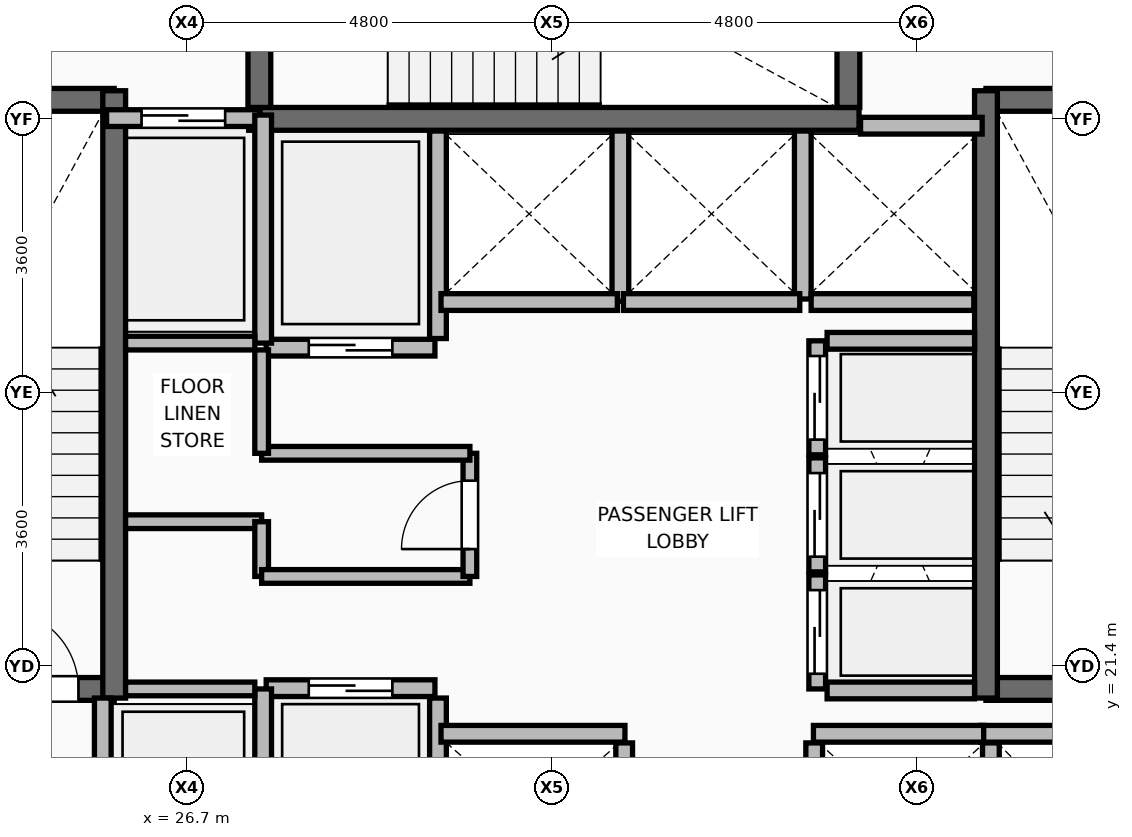
"""IFC4 building model, lengths in metres.
Left out: names, types, materials, properties, quantities, classifications, styles, units other than length and angle.
Written with IfcOpenShell. Run it as: python <this file> out.ifc"""

import sys

from ifc_helpers import new_model, si_unit, direction, frame, frame_2d, origin, place, context, subcontext, project, spatial, rectangle, extrude, element, fill, save


model = new_model("IFC4")
c1 = context("Model", 3, precision=1e-05, world=origin(), true_north=direction((0.0, 1.0)))
c2 = subcontext(c1, "Body", "Model", "MODEL_VIEW")
j1 = project(units=[si_unit("LENGTHUNIT", "METRE"), si_unit("PLANEANGLEUNIT", "RADIAN")], contexts=[c1])
p1 = place(None, origin())
s1 = spatial("IfcSite", under=j1, at=p1, CompositionType="ELEMENT")
p2 = place(p1, origin())
s2 = spatial("IfcBuilding", under=s1, at=p2, CompositionType="ELEMENT")
p3 = place(p2, frame((0.0, 0.0, 145.95)))
s3 = spatial("IfcBuildingStorey", under=s2, at=p3, CompositionType="ELEMENT", Elevation=145.95)
p4 = place(p3, frame((30.0, 18.08, 0.0), z_axis=(0.0, 0.0, 1.0), x_axis=(0.0, 1.0, 0.0)))
e1 = element("IfcWall", 1, at=p4, inside=s3, PredefinedType="PARTITIONING", context=c2, shape_type="SweptSolid", body=[
    extrude(rectangle(XDim=2.9, YDim=0.22, at=frame_2d((1.45, 0.0))), origin(), (0.0, 0.0, 1.0), 3.545),
])
for number, where, z_axis, x_axis in (
    (2, (32.45, 17.92, 0.0), (0.0, 0.0, 1.0), (0.0, 1.0, 0.0)),
    (3, (34.95, 17.92, 0.0), (0.0, 0.0, 1.0), (0.0, 1.0, 0.0)),
):
    element("IfcWall", number, at=place(p3, frame(where, z_axis=z_axis, x_axis=x_axis)), inside=s3, PredefinedType="PARTITIONING", context=c2, shape_type="SweptSolid", body=[
        extrude(rectangle(XDim=2.47, YDim=0.22, at=frame_2d((1.235, 0.0))), origin(), (0.0, 0.0, 1.0), 3.006),
    ])
p5 = place(p3, frame((37.275, 18.08, 0.0), z_axis=(0.0, 0.0, 1.0), x_axis=(0.0, 1.0, 0.0)))
e4 = element("IfcWall", 4, at=p5, inside=s3, PredefinedType="PARTITIONING", context=c2, shape_type="SweptSolid", body=[
    extrude(rectangle(XDim=2.31, YDim=0.22, at=frame_2d((1.155, 0.0))), origin(), (0.0, 0.0, 1.0), 3.545),
])
p6 = place(p3, frame((30.0, 25.71, 0.0), z_axis=(0.0, 0.0, 1.0), x_axis=(0.0, 1.0, 0.0)))
e5 = element("IfcWall", 5, at=p6, inside=s3, PredefinedType="PARTITIONING", context=c2, shape_type="SweptSolid", body=[
    extrude(rectangle(XDim=2.73, YDim=0.22, at=frame_2d((1.365, 0.0))), origin(), (0.0, 0.0, 1.0), 3.545),
])
p7 = place(p3, frame((32.4, 26.2, 0.0), z_axis=(0.0, 0.0, 1.0), x_axis=(0.0, 1.0, 0.0)))
e6 = element("IfcWall", 6, at=p7, inside=s3, PredefinedType="PARTITIONING", context=c2, shape_type="SweptSolid", body=[
    extrude(rectangle(XDim=2.24, YDim=0.22, at=frame_2d((1.12, 0.0))), origin(), (0.0, 0.0, 1.0), 3.545),
])
p8 = place(p3, frame((34.8, 26.23, 0.0), z_axis=(0.0, 0.0, 1.0), x_axis=(0.0, 1.0, 0.0)))
e7 = element("IfcWall", 7, at=p8, inside=s3, PredefinedType="PARTITIONING", context=c2, shape_type="SweptSolid", body=[
    extrude(rectangle(XDim=2.21, YDim=0.22, at=frame_2d((1.105, 0.0))), origin(), (0.0, 0.0, 1.0), 3.545),
])
p9 = place(p3, frame((34.91, 26.19, 0.0), z_axis=(0.0, 0.0, 1.0), x_axis=(1.0, 0.0, 0.0)))
e8 = element("IfcWall", 8, at=p9, inside=s3, PredefinedType="PARTITIONING", context=c2, shape_type="SweptSolid", body=[
    extrude(rectangle(XDim=2.14, YDim=0.22, at=frame_2d((1.07, 0.0))), origin(), (0.0, 0.0, 1.0), 3.545),
])
p10 = place(p3, frame((22.175, 21.1, 0.0), z_axis=(0.0, 0.0, 1.0), x_axis=(1.0, 0.0, 0.0)))
e9 = element("IfcWall", 9, at=p10, inside=s3, PredefinedType="SHEAR", context=c2, shape_type="SweptSolid", body=[
    extrude(rectangle(XDim=3.565, YDim=0.3, at=frame_2d((1.782, 0.0))), origin(), (0.0, 0.0, 1.0), 3.57),
])
p11 = place(p10, frame((2.045, 0.0, 0.0)))
e10 = element("IfcOpeningElement", 10, at=p11, cuts=e9, PredefinedType="OPENING", context=c2, shape_type="SweptSolid", body=[
    extrude(rectangle(XDim=1.05, YDim=2.1, at=frame_2d((0.525, 1.05))), frame((0.0, 0.16, 0.0), z_axis=(0.0, -1.0, 0.0), x_axis=(1.0, 0.0, 0.0)), (0.0, 0.0, 1.0), 0.32),
])
p12 = place(p3, frame((22.175, 28.85, 0.0), z_axis=(0.0, 0.0, 1.0), x_axis=(1.0, 0.0, 0.0)))
e11 = element("IfcWall", 11, at=p12, inside=s3, PredefinedType="SHEAR", context=c2, shape_type="SweptSolid", body=[
    extrude(rectangle(XDim=3.565, YDim=0.3, at=frame_2d((1.782, 0.0))), origin(), (0.0, 0.0, 1.0), 3.57),
])
p13 = place(p3, frame((25.74, 20.98, 0.0), z_axis=(0.0, 0.0, 1.0), x_axis=(0.0, 1.0, 0.0)))
e12 = element("IfcWall", 12, at=p13, inside=s3, PredefinedType="SHEAR", context=c2, shape_type="SweptSolid", body=[
    extrude(rectangle(XDim=7.99, YDim=0.3, at=frame_2d((3.995, 0.0))), origin(), (0.0, 0.0, 1.0), 3.57),
])
for number, where, z_axis, x_axis in (
    (13, (37.21, 21.1, 0.0), (0.0, 0.0, 1.0), (1.0, 0.0, 0.0)),
    (14, (37.21, 28.85, 0.0), (0.0, 0.0, 1.0), (1.0, 0.0, 0.0)),
):
    element("IfcWall", number, at=place(p3, frame(where, z_axis=z_axis, x_axis=x_axis)), inside=s3, PredefinedType="SHEAR", context=c2, shape_type="SweptSolid", body=[
        extrude(rectangle(XDim=3.615, YDim=0.3, at=frame_2d((1.808, 0.0))), origin(), (0.0, 0.0, 1.0), 3.57),
    ])
p14 = place(p3, frame((37.21, 20.98, 0.0), z_axis=(0.0, 0.0, 1.0), x_axis=(0.0, 1.0, 0.0)))
e15 = element("IfcWall", 15, at=p14, inside=s3, PredefinedType="SHEAR", context=c2, shape_type="SweptSolid", body=[
    extrude(rectangle(XDim=7.99, YDim=0.3, at=frame_2d((3.995, 0.0))), origin(), (0.0, 0.0, 1.0), 3.57),
])
p15 = place(p3, frame((27.51, 28.6, 0.0), z_axis=(0.0, 0.0, 1.0), x_axis=(1.0, 0.0, 0.0)))
e16 = element("IfcWall", 16, at=p15, inside=s3, PredefinedType="SHEAR", context=c2, shape_type="SweptSolid", body=[
    extrude(rectangle(XDim=8.03, YDim=0.3, at=frame_2d((4.015, 0.0))), origin(), (0.0, 0.0, 1.0), 3.57),
])
p16 = place(p3, frame((27.65, 28.75, 0.0), z_axis=(0.0, 0.0, 1.0), x_axis=(0.0, 1.0, 0.0)))
e17 = element("IfcWall", 17, at=p16, inside=s3, PredefinedType="SHEAR", context=c2, shape_type="SweptSolid", body=[
    extrude(rectangle(XDim=3.425, YDim=0.3, at=frame_2d((1.712, 0.0))), origin(), (0.0, 0.0, 1.0), 3.57),
])
p17 = place(p16, frame((1.0, 0.0, 0.0)))
e18 = element("IfcOpeningElement", 18, at=p17, cuts=e17, PredefinedType="OPENING", context=c2, shape_type="SweptSolid", body=[
    extrude(rectangle(XDim=1.05, YDim=2.1, at=frame_2d((0.525, 1.05))), frame((0.0, 0.16, 0.0), z_axis=(0.0, -1.0, 0.0), x_axis=(1.0, 0.0, 0.0)), (0.0, 0.0, 1.0), 0.32),
])
p18 = place(p3, frame((35.4, 28.75, 0.0), z_axis=(0.0, 0.0, 1.0), x_axis=(0.0, 1.0, 0.0)))
e19 = element("IfcWall", 19, at=p18, inside=s3, PredefinedType="SHEAR", context=c2, shape_type="SweptSolid", body=[
    extrude(rectangle(XDim=3.425, YDim=0.3, at=frame_2d((1.712, 0.0))), origin(), (0.0, 0.0, 1.0), 3.57),
])
p19 = place(p3, frame((25.59, 18.22, 0.0), z_axis=(0.0, 0.0, 1.0), x_axis=(0.0, 1.0, 0.0)))
e20 = element("IfcWall", 20, at=p19, inside=s3, PredefinedType="PARTITIONING", context=c2, shape_type="SweptSolid", body=[
    extrude(rectangle(XDim=2.76, YDim=0.22, at=frame_2d((1.38, 0.0))), origin(), (0.0, 0.0, 1.0), 3.55),
])
p20 = place(p19, frame((0.83, 0.0, 0.0)))
e21 = element("IfcOpeningElement", 21, at=p20, cuts=e20, PredefinedType="OPENING", context=c2, shape_type="SweptSolid", body=[
    extrude(rectangle(XDim=1.1, YDim=2.2, at=frame_2d((0.55, 1.1))), frame((0.0, 0.12, 0.0), z_axis=(0.0, -1.0, 0.0), x_axis=(1.0, 0.0, 0.0)), (0.0, 0.0, 1.0), 0.24),
])
p21 = place(p3, frame((25.64, 28.61, 0.0), z_axis=(0.0, 0.0, 1.0), x_axis=(1.0, 0.0, 0.0)))
e22 = element("IfcWall", 22, at=p21, inside=s3, PredefinedType="PARTITIONING", context=c2, shape_type="SweptSolid", body=[
    extrude(rectangle(XDim=2.02, YDim=0.22, at=frame_2d((1.01, 0.0))), origin(), (0.0, 0.0, 1.0), 3.55),
])
p22 = place(p21, frame((0.46, 0.0, 0.0)))
e23 = element("IfcOpeningElement", 23, at=p22, cuts=e22, PredefinedType="OPENING", context=c2, shape_type="SweptSolid", body=[
    extrude(rectangle(XDim=1.1, YDim=2.2, at=frame_2d((0.55, 1.1))), frame((0.0, 0.12, 0.0), z_axis=(0.0, -1.0, 0.0), x_axis=(1.0, 0.0, 0.0)), (0.0, 0.0, 1.0), 0.24),
])
p23 = place(p3, frame((27.74, 21.11, 0.0), z_axis=(0.0, 0.0, 1.0), x_axis=(1.0, 0.0, 0.0)))
e24 = element("IfcWall", 24, at=p23, inside=s3, PredefinedType="PARTITIONING", context=c2, shape_type="SweptSolid", body=[
    extrude(rectangle(XDim=2.22, YDim=0.22, at=frame_2d((1.11, 0.0))), origin(), (0.0, 0.0, 1.0), 3.55),
])
p24 = place(p23, frame((0.56, 0.0, 0.0)))
e25 = element("IfcOpeningElement", 25, at=p24, cuts=e24, PredefinedType="OPENING", context=c2, shape_type="SweptSolid", body=[
    extrude(rectangle(XDim=1.1, YDim=2.2, at=frame_2d((0.55, 1.1))), frame((0.0, 0.12, 0.0), z_axis=(0.0, -1.0, 0.0), x_axis=(1.0, 0.0, 0.0)), (0.0, 0.0, 1.0), 0.24),
])
p25 = place(p3, frame((27.74, 25.59, 0.0), z_axis=(0.0, 0.0, 1.0), x_axis=(1.0, 0.0, 0.0)))
e26 = element("IfcWall", 26, at=p25, inside=s3, PredefinedType="PARTITIONING", context=c2, shape_type="SweptSolid", body=[
    extrude(rectangle(XDim=2.22, YDim=0.22, at=frame_2d((1.11, 0.0))), origin(), (0.0, 0.0, 1.0), 3.55),
])
p26 = place(p25, frame((0.56, 0.0, 0.0)))
e27 = element("IfcOpeningElement", 27, at=p26, cuts=e26, PredefinedType="OPENING", context=c2, shape_type="SweptSolid", body=[
    extrude(rectangle(XDim=1.1, YDim=2.2, at=frame_2d((0.55, 1.1))), frame((0.0, 0.12, 0.0), z_axis=(0.0, -1.0, 0.0), x_axis=(1.0, 0.0, 0.0)), (0.0, 0.0, 1.0), 0.24),
])
p27 = place(p3, frame((30.04, 20.51, 0.0), z_axis=(0.0, 0.0, 1.0), x_axis=(1.0, 0.0, 0.0)))
e28 = element("IfcWall", 28, at=p27, inside=s3, PredefinedType="PARTITIONING", context=c2, shape_type="SweptSolid", body=[
    extrude(rectangle(XDim=2.42, YDim=0.22, at=frame_2d((1.21, 0.0))), origin(), (0.0, 0.0, 1.0), 3.55),
])
for number, where, z_axis, x_axis in (
    (29, (37.14, 20.51, 0.0), (0.0, 0.0, 1.0), (1.0, 0.0, 0.0)),
    (30, (34.94, 20.51, 0.0), (0.0, 0.0, 1.0), (1.0, 0.0, 0.0)),
):
    element("IfcWall", number, at=place(p3, frame(where, z_axis=z_axis, x_axis=x_axis)), inside=s3, PredefinedType="PARTITIONING", context=c2, shape_type="SweptSolid", body=[
        extrude(rectangle(XDim=2.24, YDim=0.22, at=frame_2d((1.12, 0.0))), origin(), (0.0, 0.0, 1.0), 3.55),
    ])
for number, where, z_axis, x_axis in (
    (31, (30.04, 26.19, 0.0), (0.0, 0.0, 1.0), (1.0, 0.0, 0.0)),
    (32, (32.44, 26.19, 0.0), (0.0, 0.0, 1.0), (1.0, 0.0, 0.0)),
):
    element("IfcWall", number, at=place(p3, frame(where, z_axis=z_axis, x_axis=x_axis)), inside=s3, PredefinedType="PARTITIONING", context=c2, shape_type="SweptSolid", body=[
        extrude(rectangle(XDim=2.32, YDim=0.22, at=frame_2d((1.16, 0.0))), origin(), (0.0, 0.0, 1.0), 3.55),
    ])
p28 = place(p3, frame((35.56, 28.51, 0.0), z_axis=(0.0, 0.0, 1.0), x_axis=(1.0, 0.0, 0.0)))
e33 = element("IfcWall", 33, at=p28, inside=s3, PredefinedType="PARTITIONING", context=c2, shape_type="SweptSolid", body=[
    extrude(rectangle(XDim=1.6, YDim=0.22, at=frame_2d((0.8, 0.0))), origin(), (0.0, 0.0, 1.0), 3.55),
])
p29 = place(p3, frame((34.99, 21.1, 0.0), z_axis=(0.0, 0.0, 1.0), x_axis=(0.0, 1.0, 0.0)))
e34 = element("IfcWall", 34, at=p29, inside=s3, PredefinedType="PARTITIONING", context=c2, shape_type="SweptSolid", body=[
    extrude(rectangle(XDim=1.5, YDim=0.22, at=frame_2d((0.75, 0.0))), origin(), (0.0, 0.0, 1.0), 3.55),
])
p30 = place(p29, frame((0.2, 0.0, 0.0)))
e35 = element("IfcOpeningElement", 35, at=p30, cuts=e34, PredefinedType="OPENING", context=c2, shape_type="SweptSolid", body=[
    extrude(rectangle(XDim=1.1, YDim=2.2, at=frame_2d((0.55, 1.1))), frame((0.0, 0.12, 0.0), z_axis=(0.0, -1.0, 0.0), x_axis=(1.0, 0.0, 0.0)), (0.0, 0.0, 1.0), 0.24),
])
p31 = place(p3, frame((34.99, 22.64, 0.0), z_axis=(0.0, 0.0, 1.0), x_axis=(0.0, 1.0, 0.0)))
e36 = element("IfcWall", 36, at=p31, inside=s3, PredefinedType="PARTITIONING", context=c2, shape_type="SweptSolid", body=[
    extrude(rectangle(XDim=1.5, YDim=0.22, at=frame_2d((0.75, 0.0))), origin(), (0.0, 0.0, 1.0), 3.55),
])
p32 = place(p31, frame((0.2, 0.0, 0.0)))
e37 = element("IfcOpeningElement", 37, at=p32, cuts=e36, PredefinedType="OPENING", context=c2, shape_type="SweptSolid", body=[
    extrude(rectangle(XDim=1.1, YDim=2.2, at=frame_2d((0.55, 1.1))), frame((0.0, 0.12, 0.0), z_axis=(0.0, -1.0, 0.0), x_axis=(1.0, 0.0, 0.0)), (0.0, 0.0, 1.0), 0.24),
])
p33 = place(p3, frame((34.99, 24.18, 0.0), z_axis=(0.0, 0.0, 1.0), x_axis=(0.0, 1.0, 0.0)))
e38 = element("IfcWall", 38, at=p33, inside=s3, PredefinedType="PARTITIONING", context=c2, shape_type="SweptSolid", body=[
    extrude(rectangle(XDim=1.5, YDim=0.22, at=frame_2d((0.75, 0.0))), origin(), (0.0, 0.0, 1.0), 3.55),
])
p34 = place(p33, frame((0.2, 0.0, 0.0)))
e39 = element("IfcOpeningElement", 39, at=p34, cuts=e38, PredefinedType="OPENING", context=c2, shape_type="SweptSolid", body=[
    extrude(rectangle(XDim=1.1, YDim=2.2, at=frame_2d((0.55, 1.1))), frame((0.0, 0.12, 0.0), z_axis=(0.0, -1.0, 0.0), x_axis=(1.0, 0.0, 0.0)), (0.0, 0.0, 1.0), 0.24),
])
p35 = place(p3, frame((27.7, 18.15, 0.0), z_axis=(0.0, 0.0, 1.0), x_axis=(0.0, 1.0, 0.0)))
e40 = element("IfcWall", 40, at=p35, inside=s3, PredefinedType="PARTITIONING", context=c2, shape_type="SweptSolid", body=[
    extrude(rectangle(XDim=2.95, YDim=0.22, at=frame_2d((1.475, 0.0))), origin(), (0.0, 0.0, 1.0), 3.55),
])
p36 = place(p3, frame((27.7, 25.65, 0.0), z_axis=(0.0, 0.0, 1.0), x_axis=(0.0, 1.0, 0.0)))
e41 = element("IfcWall", 41, at=p36, inside=s3, PredefinedType="PARTITIONING", context=c2, shape_type="SweptSolid", body=[
    extrude(rectangle(XDim=3.0, YDim=0.22, at=frame_2d((1.5, 0.0))), origin(), (0.0, 0.0, 1.0), 3.55),
])
for number, where, z_axis, x_axis in (
    (42, (35.12, 21.08, 0.0), (0.0, 0.0, 1.0), (1.0, 0.0, 0.0)),
    (43, (35.12, 25.68, 0.0), (0.0, 0.0, 1.0), (1.0, 0.0, 0.0)),
):
    element("IfcWall", number, at=place(p3, frame(where, z_axis=z_axis, x_axis=x_axis)), inside=s3, PredefinedType="PARTITIONING", context=c2, shape_type="SweptSolid", body=[
        extrude(rectangle(XDim=1.94, YDim=0.22, at=frame_2d((0.97, 0.0))), origin(), (0.0, 0.0, 1.0), 3.55),
    ])
for number, where, z_axis, x_axis in (
    (44, (25.89, 21.1, 0.0), (0.0, 0.0, 1.0), (1.0, 0.0, 0.0)),
    (45, (25.89, 25.65, 0.0), (0.0, 0.0, 1.0), (1.0, 0.0, 0.0)),
):
    element("IfcWall", number, at=place(p3, frame(where, z_axis=z_axis, x_axis=x_axis)), inside=s3, PredefinedType="PARTITIONING", context=c2, shape_type="SweptSolid", body=[
        extrude(rectangle(XDim=1.7, YDim=0.18, at=frame_2d((0.85, 0.0))), origin(), (0.0, 0.0, 1.0), 3.55),
    ])
p37 = place(p3, frame((25.89, 23.3, 0.0), z_axis=(0.0, 0.0, 1.0), x_axis=(1.0, 0.0, 0.0)))
e46 = element("IfcWall", 46, at=p37, inside=s3, PredefinedType="PARTITIONING", context=c2, shape_type="SweptSolid", body=[
    extrude(rectangle(XDim=1.79, YDim=0.18, at=frame_2d((0.895, 0.0))), origin(), (0.0, 0.0, 1.0), 3.55),
])
p38 = place(p3, frame((27.68, 22.58, 0.0), z_axis=(0.0, 0.0, 1.0), x_axis=(0.0, 1.0, 0.0)))
e47 = element("IfcWall", 47, at=p38, inside=s3, PredefinedType="PARTITIONING", context=c2, shape_type="SweptSolid", body=[
    extrude(rectangle(XDim=0.72, YDim=0.18, at=frame_2d((0.36, 0.0))), origin(), (0.0, 0.0, 1.0), 3.55),
])
p39 = place(p3, frame((27.68, 22.58, 0.0), z_axis=(0.0, 0.0, 1.0), x_axis=(1.0, 0.0, 0.0)))
e48 = element("IfcWall", 48, at=p39, inside=s3, PredefinedType="PARTITIONING", context=c2, shape_type="SweptSolid", body=[
    extrude(rectangle(XDim=2.74, YDim=0.18, at=frame_2d((1.37, 0.0))), origin(), (0.0, 0.0, 1.0), 3.55),
])
p40 = place(p3, frame((30.42, 22.58, 0.0), z_axis=(0.0, 0.0, 1.0), x_axis=(0.0, 1.0, 0.0)))
e49 = element("IfcWall", 49, at=p40, inside=s3, PredefinedType="PARTITIONING", context=c2, shape_type="SweptSolid", body=[
    extrude(rectangle(XDim=1.62, YDim=0.18, at=frame_2d((0.81, 0.0))), origin(), (0.0, 0.0, 1.0), 3.55),
])
p41 = place(p40, frame((0.36, 0.0, 0.0)))
e50 = element("IfcOpeningElement", 50, at=p41, cuts=e49, PredefinedType="OPENING", context=c2, shape_type="SweptSolid", body=[
    extrude(rectangle(XDim=0.9, YDim=2.1, at=frame_2d((0.45, 1.05))), frame((0.0, 0.1, 0.0), z_axis=(0.0, -1.0, 0.0), x_axis=(1.0, 0.0, 0.0)), (0.0, 0.0, 1.0), 0.2),
])
p42 = place(p3, frame((27.68, 24.2, 0.0), z_axis=(0.0, 0.0, 1.0), x_axis=(1.0, 0.0, 0.0)))
e51 = element("IfcWall", 51, at=p42, inside=s3, PredefinedType="PARTITIONING", context=c2, shape_type="SweptSolid", body=[
    extrude(rectangle(XDim=2.74, YDim=0.18, at=frame_2d((1.37, 0.0))), origin(), (0.0, 0.0, 1.0), 3.55),
])
p43 = place(p3, frame((27.68, 24.2, 0.0), z_axis=(0.0, 0.0, 1.0), x_axis=(0.0, 1.0, 0.0)))
e52 = element("IfcWall", 52, at=p43, inside=s3, PredefinedType="PARTITIONING", context=c2, shape_type="SweptSolid", body=[
    extrude(rectangle(XDim=1.36, YDim=0.18, at=frame_2d((0.68, 0.0))), origin(), (0.0, 0.0, 1.0), 3.55),
])
p44 = place(p11, origin())
e53 = element("IfcDoor", 53, at=p44, inside=s3, OperationType="SINGLE_SWING_LEFT", PredefinedType="DOOR", context=c2, shape_type="SweptSolid", body=[
    extrude(rectangle(XDim=1.05, YDim=2.1, at=frame_2d((0.525, 1.05))), frame((0.0, 0.025, 0.0), z_axis=(0.0, -1.0, 0.0), x_axis=(1.0, 0.0, 0.0)), (0.0, 0.0, 1.0), 0.05),
])
fill(e10, e53)
p45 = place(p22, origin())
e54 = element("IfcDoor", 54, at=p45, inside=s3, OperationType="DOUBLE_DOOR_SLIDING", PredefinedType="DOOR", context=c2, shape_type="SweptSolid", body=[
    extrude(rectangle(XDim=1.1, YDim=2.2, at=frame_2d((0.55, 1.1))), frame((0.0, 0.025, 0.0), z_axis=(0.0, -1.0, 0.0), x_axis=(1.0, 0.0, 0.0)), (0.0, 0.0, 1.0), 0.05),
])
fill(e23, e54)
p46 = place(p24, origin())
e55 = element("IfcDoor", 55, at=p46, inside=s3, OperationType="DOUBLE_DOOR_SLIDING", PredefinedType="DOOR", context=c2, shape_type="SweptSolid", body=[
    extrude(rectangle(XDim=1.1, YDim=2.2, at=frame_2d((0.55, 1.1))), frame((0.0, 0.025, 0.0), z_axis=(0.0, -1.0, 0.0), x_axis=(1.0, 0.0, 0.0)), (0.0, 0.0, 1.0), 0.05),
])
fill(e25, e55)
p47 = place(p26, frame((1.1, 0.0, 0.0), z_axis=(0.0, 0.0, 1.0), x_axis=(-1.0, 0.0, 0.0)))
e56 = element("IfcDoor", 56, at=p47, inside=s3, OperationType="DOUBLE_DOOR_SLIDING", PredefinedType="DOOR", context=c2, shape_type="SweptSolid", body=[
    extrude(rectangle(XDim=1.1, YDim=2.2, at=frame_2d((0.55, 1.1))), frame((0.0, 0.025, 0.0), z_axis=(0.0, -1.0, 0.0), x_axis=(1.0, 0.0, 0.0)), (0.0, 0.0, 1.0), 0.05),
])
fill(e27, e56)
p48 = place(p30, origin())
e57 = element("IfcDoor", 57, at=p48, inside=s3, OperationType="DOUBLE_DOOR_SLIDING", PredefinedType="DOOR", context=c2, shape_type="SweptSolid", body=[
    extrude(rectangle(XDim=1.1, YDim=2.2, at=frame_2d((0.55, 1.1))), frame((0.0, 0.025, 0.0), z_axis=(0.0, -1.0, 0.0), x_axis=(1.0, 0.0, 0.0)), (0.0, 0.0, 1.0), 0.05),
])
fill(e35, e57)
p49 = place(p32, origin())
e58 = element("IfcDoor", 58, at=p49, inside=s3, OperationType="DOUBLE_DOOR_SLIDING", PredefinedType="DOOR", context=c2, shape_type="SweptSolid", body=[
    extrude(rectangle(XDim=1.1, YDim=2.2, at=frame_2d((0.55, 1.1))), frame((0.0, 0.025, 0.0), z_axis=(0.0, -1.0, 0.0), x_axis=(1.0, 0.0, 0.0)), (0.0, 0.0, 1.0), 0.05),
])
fill(e37, e58)
p50 = place(p34, origin())
e59 = element("IfcDoor", 59, at=p50, inside=s3, OperationType="DOUBLE_DOOR_SLIDING", PredefinedType="DOOR", context=c2, shape_type="SweptSolid", body=[
    extrude(rectangle(XDim=1.1, YDim=2.2, at=frame_2d((0.55, 1.1))), frame((0.0, 0.025, 0.0), z_axis=(0.0, -1.0, 0.0), x_axis=(1.0, 0.0, 0.0)), (0.0, 0.0, 1.0), 0.05),
])
fill(e39, e59)
p51 = place(p41, origin())
e60 = element("IfcDoor", 60, at=p51, inside=s3, OperationType="SINGLE_SWING_LEFT", PredefinedType="DOOR", context=c2, shape_type="SweptSolid", body=[
    extrude(rectangle(XDim=0.9, YDim=2.1, at=frame_2d((0.45, 1.05))), frame((0.0, 0.025, 0.0), z_axis=(0.0, -1.0, 0.0), x_axis=(1.0, 0.0, 0.0)), (0.0, 0.0, 1.0), 0.05),
])
fill(e50, e60)
save(model, sys.argv[1])
